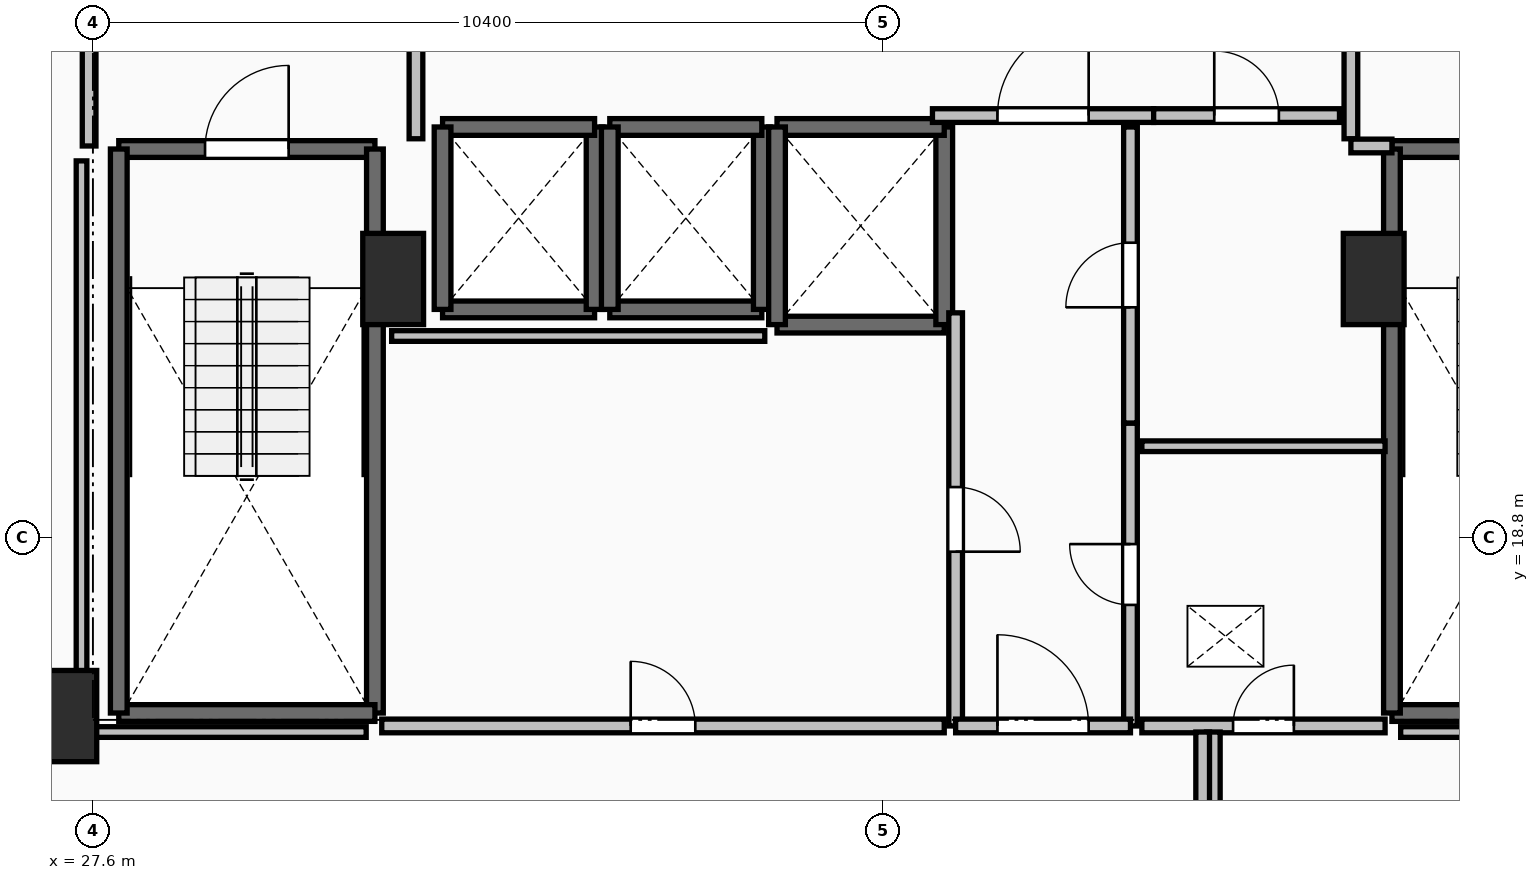
"""IFC4 building model, lengths in metres.
Left out: names, types, materials, properties, quantities, classifications, styles, units other than length and angle.
Written with IfcOpenShell. Run it as: python <this file> out.ifc"""

import sys

from ifc_helpers import new_model, si_unit, direction, frame, frame_2d, origin, origin_2d, place, context, subcontext, project, spatial, rectangle, extrude, element, fill, save


model = new_model("IFC4")
c1 = context("Model", 3, precision=1e-05, world=origin(), true_north=direction((0.0, 1.0)))
c2 = subcontext(c1, "Body", "Model", "MODEL_VIEW")
j1 = project(units=[si_unit("LENGTHUNIT", "METRE"), si_unit("PLANEANGLEUNIT", "RADIAN")], contexts=[c1])
p1 = place(None, origin())
s1 = spatial("IfcSite", under=j1, at=p1, CompositionType="ELEMENT")
p2 = place(p1, origin())
s2 = spatial("IfcBuilding", under=s1, at=p2, CompositionType="ELEMENT")
p3 = place(p2, frame((0.0, 0.0, 120.8)))
s3 = spatial("IfcBuildingStorey", under=s2, at=p3, CompositionType="ELEMENT", Elevation=120.8)
for number, where, z_axis, x_axis in (
    (1, (27.25, 16.45, 0.0), (0.0, 0.0, 1.0), (1.0, 0.0, 0.0)),
    (2, (31.55, 22.2, 0.0), (0.0, 0.0, 1.0), (1.0, 0.0, 0.0)),
    (3, (44.45, 22.2, 0.0), (0.0, 0.0, 1.0), (1.0, 0.0, 0.0)),
):
    element("IfcColumn", number, at=place(p3, frame(where, z_axis=z_axis, x_axis=x_axis)), inside=s3, PredefinedType="PILASTER", context=c2, shape_type="SweptSolid", body=[
        extrude(rectangle(XDim=0.8, YDim=1.2, at=origin_2d()), origin(), (0.0, 0.0, 1.0), 3.5),
    ])
p4 = place(p3, frame((27.94, 23.91, 0.0), z_axis=(0.0, 0.0, 1.0), x_axis=(1.0, 0.0, 0.0)))
e4 = element("IfcWall", 4, at=p4, inside=s3, PredefinedType="SOLIDWALL", context=c2, shape_type="SweptSolid", body=[
    extrude(rectangle(XDim=3.37, YDim=0.22, at=frame_2d((1.685, 0.0))), origin(), (0.0, 0.0, 1.0), 3.15),
])
p5 = place(p4, frame((1.135, 0.0, 0.0)))
e5 = element("IfcOpeningElement", 5, at=p5, cuts=e4, PredefinedType="OPENING", context=c2, shape_type="SweptSolid", body=[
    extrude(rectangle(XDim=1.1, YDim=2.15, at=frame_2d((0.55, 1.075))), frame((0.0, 0.125, 0.0), z_axis=(0.0, -1.0, 0.0), x_axis=(1.0, 0.0, 0.0)), (0.0, 0.0, 1.0), 0.25),
])
p6 = place(p3, frame((31.31, 23.91, 0.0), z_axis=(0.0, 0.0, 1.0), x_axis=(0.0, -1.0, 0.0)))
e6 = element("IfcWall", 6, at=p6, inside=s3, PredefinedType="SOLIDWALL", context=c2, shape_type="SweptSolid", body=[
    extrude(rectangle(XDim=7.42, YDim=0.22, at=frame_2d((3.71, 0.0))), origin(), (0.0, 0.0, 1.0), 3.15),
])
p7 = place(p3, frame((31.31, 16.49, 0.0), z_axis=(0.0, 0.0, 1.0), x_axis=(-1.0, 0.0, 0.0)))
e7 = element("IfcWall", 7, at=p7, inside=s3, PredefinedType="SOLIDWALL", context=c2, shape_type="SweptSolid", body=[
    extrude(rectangle(XDim=3.37, YDim=0.22, at=frame_2d((1.685, 0.0))), origin(), (0.0, 0.0, 1.0), 3.15),
])
p8 = place(p3, frame((27.94, 16.49, 0.0), z_axis=(0.0, 0.0, 1.0), x_axis=(0.0, 1.0, 0.0)))
e8 = element("IfcWall", 8, at=p8, inside=s3, PredefinedType="SOLIDWALL", context=c2, shape_type="SweptSolid", body=[
    extrude(rectangle(XDim=7.42, YDim=0.22, at=frame_2d((3.71, 0.0))), origin(), (0.0, 0.0, 1.0), 3.15),
])
p9 = place(p3, frame((44.69, 23.91, 0.0), z_axis=(0.0, 0.0, 1.0), x_axis=(1.0, 0.0, 0.0)))
e9 = element("IfcWall", 9, at=p9, inside=s3, PredefinedType="SOLIDWALL", context=c2, shape_type="SweptSolid", body=[
    extrude(rectangle(XDim=3.37, YDim=0.22, at=frame_2d((1.685, 0.0))), origin(), (0.0, 0.0, 1.0), 3.15),
])
p10 = place(p9, frame((1.135, 0.0, 0.0)))
e10 = element("IfcOpeningElement", 10, at=p10, cuts=e9, PredefinedType="OPENING", context=c2, shape_type="SweptSolid", body=[
    extrude(rectangle(XDim=1.1, YDim=2.15, at=frame_2d((0.55, 1.075))), frame((0.0, 0.125, 0.0), z_axis=(0.0, -1.0, 0.0), x_axis=(1.0, 0.0, 0.0)), (0.0, 0.0, 1.0), 0.25),
])
p11 = place(p3, frame((48.06, 16.49, 0.0), z_axis=(0.0, 0.0, 1.0), x_axis=(-1.0, 0.0, 0.0)))
e11 = element("IfcWall", 11, at=p11, inside=s3, PredefinedType="SOLIDWALL", context=c2, shape_type="SweptSolid", body=[
    extrude(rectangle(XDim=3.37, YDim=0.22, at=frame_2d((1.685, 0.0))), origin(), (0.0, 0.0, 1.0), 3.15),
])
p12 = place(p3, frame((44.69, 16.49, 0.0), z_axis=(0.0, 0.0, 1.0), x_axis=(0.0, 1.0, 0.0)))
e12 = element("IfcWall", 12, at=p12, inside=s3, PredefinedType="SOLIDWALL", context=c2, shape_type="SweptSolid", body=[
    extrude(rectangle(XDim=7.42, YDim=0.22, at=frame_2d((3.71, 0.0))), origin(), (0.0, 0.0, 1.0), 3.15),
])
p13 = place(p3, frame((32.2, 21.8, 0.0), z_axis=(0.0, 0.0, 1.0), x_axis=(1.0, 0.0, 0.0)))
e13 = element("IfcWall", 13, at=p13, inside=s3, PredefinedType="SOLIDWALL", context=c2, shape_type="SweptSolid", body=[
    extrude(rectangle(XDim=2.0, YDim=0.22, at=frame_2d((1.0, 0.0))), origin(), (0.0, 0.0, 1.0), 3.15),
])
p14 = place(p3, frame((34.2, 21.8, 0.0), z_axis=(0.0, 0.0, 1.0), x_axis=(0.0, 1.0, 0.0)))
e14 = element("IfcWall", 14, at=p14, inside=s3, PredefinedType="SOLIDWALL", context=c2, shape_type="SweptSolid", body=[
    extrude(rectangle(XDim=2.4, YDim=0.22, at=frame_2d((1.2, 0.0))), origin(), (0.0, 0.0, 1.0), 3.15),
])
p15 = place(p3, frame((34.2, 24.2, 0.0), z_axis=(0.0, 0.0, 1.0), x_axis=(-1.0, 0.0, 0.0)))
e15 = element("IfcWall", 15, at=p15, inside=s3, PredefinedType="SOLIDWALL", context=c2, shape_type="SweptSolid", body=[
    extrude(rectangle(XDim=2.0, YDim=0.22, at=frame_2d((1.0, 0.0))), origin(), (0.0, 0.0, 1.0), 3.15),
])
p16 = place(p3, frame((32.2, 24.2, 0.0), z_axis=(0.0, 0.0, 1.0), x_axis=(0.0, -1.0, 0.0)))
e16 = element("IfcWall", 16, at=p16, inside=s3, PredefinedType="SOLIDWALL", context=c2, shape_type="SweptSolid", body=[
    extrude(rectangle(XDim=2.4, YDim=0.22, at=frame_2d((1.2, 0.0))), origin(), (0.0, 0.0, 1.0), 3.15),
])
p17 = place(p3, frame((34.4, 21.8, 0.0), z_axis=(0.0, 0.0, 1.0), x_axis=(1.0, 0.0, 0.0)))
e17 = element("IfcWall", 17, at=p17, inside=s3, PredefinedType="SOLIDWALL", context=c2, shape_type="SweptSolid", body=[
    extrude(rectangle(XDim=2.0, YDim=0.22, at=frame_2d((1.0, 0.0))), origin(), (0.0, 0.0, 1.0), 3.15),
])
p18 = place(p3, frame((36.4, 21.8, 0.0), z_axis=(0.0, 0.0, 1.0), x_axis=(0.0, 1.0, 0.0)))
e18 = element("IfcWall", 18, at=p18, inside=s3, PredefinedType="SOLIDWALL", context=c2, shape_type="SweptSolid", body=[
    extrude(rectangle(XDim=2.4, YDim=0.22, at=frame_2d((1.2, 0.0))), origin(), (0.0, 0.0, 1.0), 3.15),
])
p19 = place(p3, frame((36.4, 24.2, 0.0), z_axis=(0.0, 0.0, 1.0), x_axis=(-1.0, 0.0, 0.0)))
e19 = element("IfcWall", 19, at=p19, inside=s3, PredefinedType="SOLIDWALL", context=c2, shape_type="SweptSolid", body=[
    extrude(rectangle(XDim=2.0, YDim=0.22, at=frame_2d((1.0, 0.0))), origin(), (0.0, 0.0, 1.0), 3.15),
])
p20 = place(p3, frame((34.4, 24.2, 0.0), z_axis=(0.0, 0.0, 1.0), x_axis=(0.0, -1.0, 0.0)))
e20 = element("IfcWall", 20, at=p20, inside=s3, PredefinedType="SOLIDWALL", context=c2, shape_type="SweptSolid", body=[
    extrude(rectangle(XDim=2.4, YDim=0.22, at=frame_2d((1.2, 0.0))), origin(), (0.0, 0.0, 1.0), 3.15),
])
p21 = place(p3, frame((36.6, 21.6, 0.0), z_axis=(0.0, 0.0, 1.0), x_axis=(1.0, 0.0, 0.0)))
e21 = element("IfcWall", 21, at=p21, inside=s3, PredefinedType="SOLIDWALL", context=c2, shape_type="SweptSolid", body=[
    extrude(rectangle(XDim=2.2, YDim=0.22, at=frame_2d((1.1, 0.0))), origin(), (0.0, 0.0, 1.0), 3.15),
])
p22 = place(p3, frame((38.8, 21.6, 0.0), z_axis=(0.0, 0.0, 1.0), x_axis=(0.0, 1.0, 0.0)))
e22 = element("IfcWall", 22, at=p22, inside=s3, PredefinedType="SOLIDWALL", context=c2, shape_type="SweptSolid", body=[
    extrude(rectangle(XDim=2.6, YDim=0.22, at=frame_2d((1.3, 0.0))), origin(), (0.0, 0.0, 1.0), 3.15),
])
p23 = place(p3, frame((38.8, 24.2, 0.0), z_axis=(0.0, 0.0, 1.0), x_axis=(-1.0, 0.0, 0.0)))
e23 = element("IfcWall", 23, at=p23, inside=s3, PredefinedType="SOLIDWALL", context=c2, shape_type="SweptSolid", body=[
    extrude(rectangle(XDim=2.2, YDim=0.22, at=frame_2d((1.1, 0.0))), origin(), (0.0, 0.0, 1.0), 3.15),
])
p24 = place(p3, frame((36.6, 24.2, 0.0), z_axis=(0.0, 0.0, 1.0), x_axis=(0.0, -1.0, 0.0)))
e24 = element("IfcWall", 24, at=p24, inside=s3, PredefinedType="SOLIDWALL", context=c2, shape_type="SweptSolid", body=[
    extrude(rectangle(XDim=2.6, YDim=0.22, at=frame_2d((1.3, 0.0))), origin(), (0.0, 0.0, 1.0), 3.15),
])
p25 = place(p3, frame((31.85, 24.045, 0.0), z_axis=(0.0, 0.0, 1.0), x_axis=(0.0, 1.0, 0.0)))
e25 = element("IfcWall", 25, at=p25, inside=s3, PredefinedType="PARTITIONING", context=c2, shape_type="SweptSolid", body=[
    extrude(rectangle(XDim=3.91, YDim=0.18, at=frame_2d((1.955, 0.0))), origin(), (0.0, 0.0, 1.0), 3.15),
])
p26 = place(p25, frame((1.355, 0.0, 0.0)))
e26 = element("IfcOpeningElement", 26, at=p26, cuts=e25, PredefinedType="OPENING", context=c2, shape_type="SweptSolid", body=[
    extrude(rectangle(XDim=1.2, YDim=2.15, at=frame_2d((0.6, 1.075))), frame((0.0, 0.105, 0.0), z_axis=(0.0, -1.0, 0.0), x_axis=(1.0, 0.0, 0.0)), (0.0, 0.0, 1.0), 0.21),
])
p27 = place(p3, frame((27.55, 28.0, 0.0), z_axis=(0.0, 0.0, 1.0), x_axis=(0.0, -1.0, 0.0)))
e27 = element("IfcWall", 27, at=p27, inside=s3, PredefinedType="PARTITIONING", context=c2, shape_type="SweptSolid", body=[
    extrude(rectangle(XDim=4.05, YDim=0.18, at=frame_2d((2.025, 0.0))), origin(), (0.0, 0.0, 1.0), 3.15),
])
p28 = place(p27, frame((1.425, 0.0, 0.0)))
e28 = element("IfcOpeningElement", 28, at=p28, cuts=e27, PredefinedType="OPENING", context=c2, shape_type="SweptSolid", body=[
    extrude(rectangle(XDim=1.2, YDim=2.15, at=frame_2d((0.6, 1.075))), frame((0.0, 0.105, 0.0), z_axis=(0.0, -1.0, 0.0), x_axis=(1.0, 0.0, 0.0)), (0.0, 0.0, 1.0), 0.21),
])
p29 = place(p3, frame((44.15, 27.955, 0.0), z_axis=(0.0, 0.0, 1.0), x_axis=(0.0, -1.0, 0.0)))
e29 = element("IfcWall", 29, at=p29, inside=s3, PredefinedType="PARTITIONING", context=c2, shape_type="SweptSolid", body=[
    extrude(rectangle(XDim=3.91, YDim=0.18, at=frame_2d((1.955, 0.0))), origin(), (0.0, 0.0, 1.0), 3.15),
])
p30 = place(p29, frame((1.355, 0.0, 0.0)))
e30 = element("IfcOpeningElement", 30, at=p30, cuts=e29, PredefinedType="OPENING", context=c2, shape_type="SweptSolid", body=[
    extrude(rectangle(XDim=1.2, YDim=2.15, at=frame_2d((0.6, 1.075))), frame((0.0, 0.105, 0.0), z_axis=(0.0, -1.0, 0.0), x_axis=(1.0, 0.0, 0.0)), (0.0, 0.0, 1.0), 0.21),
])
p31 = place(p3, frame((44.15, 23.95, 0.0), z_axis=(0.0, 0.0, 1.0), x_axis=(1.0, 0.0, 0.0)))
e31 = element("IfcWall", 31, at=p31, inside=s3, PredefinedType="PARTITIONING", context=c2, shape_type="SweptSolid", body=[
    extrude(rectangle(XDim=0.54, YDim=0.18, at=frame_2d((0.27, 0.0))), origin(), (0.0, 0.0, 1.0), 3.15),
])
p32 = place(p3, frame((38.645, 24.35, 0.0), z_axis=(0.0, 0.0, 1.0), x_axis=(1.0, 0.0, 0.0)))
e32 = element("IfcWall", 32, at=p32, inside=s3, PredefinedType="PARTITIONING", context=c2, shape_type="SweptSolid", body=[
    extrude(rectangle(XDim=2.91, YDim=0.18, at=frame_2d((1.455, 0.0))), origin(), (0.0, 0.0, 1.0), 3.15),
])
p33 = place(p32, frame((0.855, 0.0, 0.0)))
e33 = element("IfcOpeningElement", 33, at=p33, cuts=e32, PredefinedType="OPENING", context=c2, shape_type="SweptSolid", body=[
    extrude(rectangle(XDim=1.2, YDim=2.15, at=frame_2d((0.6, 1.075))), frame((0.0, 0.105, 0.0), z_axis=(0.0, -1.0, 0.0), x_axis=(1.0, 0.0, 0.0)), (0.0, 0.0, 1.0), 0.21),
])
p34 = place(p3, frame((41.555, 24.35, 0.0), z_axis=(0.0, 0.0, 1.0), x_axis=(1.0, 0.0, 0.0)))
e34 = element("IfcWall", 34, at=p34, inside=s3, PredefinedType="PARTITIONING", context=c2, shape_type="SweptSolid", body=[
    extrude(rectangle(XDim=2.445, YDim=0.18, at=frame_2d((1.223, 0.0))), origin(), (0.0, 0.0, 1.0), 3.15),
])
p35 = place(p34, frame((0.798, 0.0, 0.0)))
e35 = element("IfcOpeningElement", 35, at=p35, cuts=e34, PredefinedType="OPENING", context=c2, shape_type="SweptSolid", body=[
    extrude(rectangle(XDim=0.85, YDim=2.1, at=frame_2d((0.425, 1.05))), frame((0.0, 0.105, 0.0), z_axis=(0.0, -1.0, 0.0), x_axis=(1.0, 0.0, 0.0)), (0.0, 0.0, 1.0), 0.21),
])
p36 = place(p3, frame((41.25, 16.32, 0.0), z_axis=(0.0, 0.0, 1.0), x_axis=(0.0, 1.0, 0.0)))
e36 = element("IfcWall", 36, at=p36, inside=s3, PredefinedType="PARTITIONING", context=c2, shape_type="SweptSolid", body=[
    extrude(rectangle(XDim=3.985, YDim=0.18, at=frame_2d((1.992, 0.0))), origin(), (0.0, 0.0, 1.0), 3.15),
])
p37 = place(p36, frame((1.593, 0.0, 0.0)))
e37 = element("IfcOpeningElement", 37, at=p37, cuts=e36, PredefinedType="OPENING", context=c2, shape_type="SweptSolid", body=[
    extrude(rectangle(XDim=0.8, YDim=2.05, at=frame_2d((0.4, 1.025))), frame((0.0, 0.105, 0.0), z_axis=(0.0, -1.0, 0.0), x_axis=(1.0, 0.0, 0.0)), (0.0, 0.0, 1.0), 0.21),
])
p38 = place(p3, frame((41.25, 20.305, 0.0), z_axis=(0.0, 0.0, 1.0), x_axis=(0.0, 1.0, 0.0)))
e38 = element("IfcWall", 38, at=p38, inside=s3, PredefinedType="PARTITIONING", context=c2, shape_type="SweptSolid", body=[
    extrude(rectangle(XDim=3.895, YDim=0.18, at=frame_2d((1.948, 0.0))), origin(), (0.0, 0.0, 1.0), 3.15),
])
p39 = place(p38, frame((1.522, 0.0, 0.0)))
e39 = element("IfcOpeningElement", 39, at=p39, cuts=e38, PredefinedType="OPENING", context=c2, shape_type="SweptSolid", body=[
    extrude(rectangle(XDim=0.85, YDim=2.1, at=frame_2d((0.425, 1.05))), frame((0.0, 0.105, 0.0), z_axis=(0.0, -1.0, 0.0), x_axis=(1.0, 0.0, 0.0)), (0.0, 0.0, 1.0), 0.21),
])
p40 = place(p3, frame((38.95, 21.755, 0.0), z_axis=(0.0, 0.0, 1.0), x_axis=(0.0, -1.0, 0.0)))
e40 = element("IfcWall", 40, at=p40, inside=s3, PredefinedType="PARTITIONING", context=c2, shape_type="SweptSolid", body=[
    extrude(rectangle(XDim=5.435, YDim=0.18, at=frame_2d((2.717, 0.0))), origin(), (0.0, 0.0, 1.0), 3.15),
])
p41 = place(p40, frame((2.292, 0.0, 0.0)))
e41 = element("IfcOpeningElement", 41, at=p41, cuts=e40, PredefinedType="OPENING", context=c2, shape_type="SweptSolid", body=[
    extrude(rectangle(XDim=0.85, YDim=2.1, at=frame_2d((0.425, 1.05))), frame((0.0, 0.105, 0.0), z_axis=(0.0, -1.0, 0.0), x_axis=(1.0, 0.0, 0.0)), (0.0, 0.0, 1.0), 0.21),
])
p42 = place(p3, frame((38.95, 16.32, 0.0), z_axis=(0.0, 0.0, 1.0), x_axis=(1.0, 0.0, 0.0)))
e42 = element("IfcWall", 42, at=p42, inside=s3, PredefinedType="PARTITIONING", context=c2, shape_type="SweptSolid", body=[
    extrude(rectangle(XDim=2.3, YDim=0.18, at=frame_2d((1.15, 0.0))), origin(), (0.0, 0.0, 1.0), 3.15),
])
p43 = place(p42, frame((0.55, 0.0, 0.0)))
e43 = element("IfcOpeningElement", 43, at=p43, cuts=e42, PredefinedType="OPENING", context=c2, shape_type="SweptSolid", body=[
    extrude(rectangle(XDim=1.2, YDim=2.15, at=frame_2d((0.6, 1.075))), frame((0.0, 0.105, 0.0), z_axis=(0.0, -1.0, 0.0), x_axis=(1.0, 0.0, 0.0)), (0.0, 0.0, 1.0), 0.21),
])
p44 = place(p3, frame((44.6, 20.0, 0.0), z_axis=(0.0, 0.0, 1.0), x_axis=(-1.0, 0.0, 0.0)))
e44 = element("IfcWall", 44, at=p44, inside=s3, PredefinedType="PARTITIONING", context=c2, shape_type="SweptSolid", body=[
    extrude(rectangle(XDim=3.2, YDim=0.14, at=frame_2d((1.6, 0.0))), origin(), (0.0, 0.0, 1.0), 3.15),
])
p45 = place(p3, frame((41.4, 16.32, 0.0), z_axis=(0.0, 0.0, 1.0), x_axis=(1.0, 0.0, 0.0)))
e45 = element("IfcWall", 45, at=p45, inside=s3, PredefinedType="PARTITIONING", context=c2, shape_type="SweptSolid", body=[
    extrude(rectangle(XDim=3.2, YDim=0.18, at=frame_2d((1.6, 0.0))), origin(), (0.0, 0.0, 1.0), 3.15),
])
p46 = place(p45, frame((1.2, 0.0, 0.0)))
e46 = element("IfcOpeningElement", 46, at=p46, cuts=e45, PredefinedType="OPENING", context=c2, shape_type="SweptSolid", body=[
    extrude(rectangle(XDim=0.8, YDim=2.05, at=frame_2d((0.4, 1.025))), frame((0.0, 0.105, 0.0), z_axis=(0.0, -1.0, 0.0), x_axis=(1.0, 0.0, 0.0)), (0.0, 0.0, 1.0), 0.21),
])
p47 = place(p3, frame((31.4, 16.32, 0.0), z_axis=(0.0, 0.0, 1.0), x_axis=(1.0, 0.0, 0.0)))
e47 = element("IfcWall", 47, at=p47, inside=s3, PredefinedType="PARTITIONING", context=c2, shape_type="SweptSolid", body=[
    extrude(rectangle(XDim=7.4, YDim=0.18, at=frame_2d((3.7, 0.0))), origin(), (0.0, 0.0, 1.0), 3.15),
])
p48 = place(p47, frame((3.275, 0.0, 0.0)))
e48 = element("IfcOpeningElement", 48, at=p48, cuts=e47, PredefinedType="OPENING", context=c2, shape_type="SweptSolid", body=[
    extrude(rectangle(XDim=0.85, YDim=2.1, at=frame_2d((0.425, 1.05))), frame((0.0, 0.105, 0.0), z_axis=(0.0, -1.0, 0.0), x_axis=(1.0, 0.0, 0.0)), (0.0, 0.0, 1.0), 0.21),
])
for number, where, z_axis, x_axis in (
    (49, (42.34, 16.24, 0.0), (0.0, 0.0, 1.0), (0.0, -1.0, 0.0)),
    (50, (42.2, 14.1, 0.0), (0.0, 0.0, 1.0), (0.0, 1.0, 0.0)),
):
    element("IfcWall", number, at=place(p3, frame(where, z_axis=z_axis, x_axis=x_axis)), inside=s3, PredefinedType="PARTITIONING", context=c2, shape_type="SweptSolid", body=[
        extrude(rectangle(XDim=2.14, YDim=0.18, at=frame_2d((1.07, 0.0))), origin(), (0.0, 0.0, 1.0), 2.784),
    ])
p49 = place(p3, frame((36.439, 21.45, 0.0), z_axis=(0.0, 0.0, 1.0), x_axis=(-1.0, 0.0, 0.0)))
e51 = element("IfcWall", 51, at=p49, inside=s3, PredefinedType="PARTITIONING", context=c2, shape_type="SweptSolid", body=[
    extrude(rectangle(XDim=4.909, YDim=0.14, at=frame_2d((2.455, 0.0))), origin(), (0.0, 0.0, 1.0), 3.15),
])
for number, where, z_axis, x_axis in (
    (52, (48.55, 16.24, 0.0), (0.0, 0.0, 1.0), (-1.0, 0.0, 0.0)),
    (53, (31.195, 16.24, 0.0), (0.0, 0.0, 1.0), (-1.0, 0.0, 0.0)),
):
    element("IfcWall", number, at=place(p3, frame(where, z_axis=z_axis, x_axis=x_axis)), inside=s3, PredefinedType="PARTITIONING", context=c2, shape_type="SweptSolid", body=[
        extrude(rectangle(XDim=3.745, YDim=0.14, at=frame_2d((1.873, 0.0))), origin(), (0.0, 0.0, 1.0), 2.342),
    ])
p50 = place(p3, frame((27.45, 16.24, 0.0), z_axis=(0.0, 0.0, 1.0), x_axis=(0.0, 1.0, 0.0)))
e54 = element("IfcWall", 54, at=p50, inside=s3, PredefinedType="PARTITIONING", context=c2, shape_type="SweptSolid", body=[
    extrude(rectangle(XDim=7.514, YDim=0.14, at=frame_2d((3.757, 0.0))), origin(), (0.0, 0.0, 1.0), 2.342),
])
p51 = place(p5, origin())
e55 = element("IfcDoor", 55, at=p51, inside=s3, OperationType="SINGLE_SWING_RIGHT", PredefinedType="DOOR", context=c2, shape_type="SweptSolid", body=[
    extrude(rectangle(XDim=1.1, YDim=2.15, at=frame_2d((0.55, 1.075))), frame((0.0, 0.025, 0.0), z_axis=(0.0, -1.0, 0.0), x_axis=(1.0, 0.0, 0.0)), (0.0, 0.0, 1.0), 0.05),
])
fill(e5, e55)
p52 = place(p33, origin())
e56 = element("IfcDoor", 56, at=p52, inside=s3, OperationType="SINGLE_SWING_RIGHT", PredefinedType="DOOR", context=c2, shape_type="SweptSolid", body=[
    extrude(rectangle(XDim=1.2, YDim=2.15, at=frame_2d((0.6, 1.075))), frame((0.0, 0.025, 0.0), z_axis=(0.0, -1.0, 0.0), x_axis=(1.0, 0.0, 0.0)), (0.0, 0.0, 1.0), 0.05),
])
fill(e33, e56)
p53 = place(p35, origin())
e57 = element("IfcDoor", 57, at=p53, inside=s3, OperationType="SINGLE_SWING_LEFT", PredefinedType="DOOR", context=c2, shape_type="SweptSolid", body=[
    extrude(rectangle(XDim=0.85, YDim=2.1, at=frame_2d((0.425, 1.05))), frame((0.0, 0.025, 0.0), z_axis=(0.0, -1.0, 0.0), x_axis=(1.0, 0.0, 0.0)), (0.0, 0.0, 1.0), 0.05),
])
fill(e35, e57)
p54 = place(p37, origin())
e58 = element("IfcDoor", 58, at=p54, inside=s3, OperationType="SINGLE_SWING_RIGHT", PredefinedType="DOOR", context=c2, shape_type="SweptSolid", body=[
    extrude(rectangle(XDim=0.8, YDim=2.05, at=frame_2d((0.4, 1.025))), frame((0.0, 0.025, 0.0), z_axis=(0.0, -1.0, 0.0), x_axis=(1.0, 0.0, 0.0)), (0.0, 0.0, 1.0), 0.05),
])
fill(e37, e58)
p55 = place(p39, origin())
e59 = element("IfcDoor", 59, at=p55, inside=s3, OperationType="SINGLE_SWING_LEFT", PredefinedType="DOOR", context=c2, shape_type="SweptSolid", body=[
    extrude(rectangle(XDim=0.85, YDim=2.1, at=frame_2d((0.425, 1.05))), frame((0.0, 0.025, 0.0), z_axis=(0.0, -1.0, 0.0), x_axis=(1.0, 0.0, 0.0)), (0.0, 0.0, 1.0), 0.05),
])
fill(e39, e59)
p56 = place(p41, origin())
e60 = element("IfcDoor", 60, at=p56, inside=s3, OperationType="SINGLE_SWING_RIGHT", PredefinedType="DOOR", context=c2, shape_type="SweptSolid", body=[
    extrude(rectangle(XDim=0.85, YDim=2.1, at=frame_2d((0.425, 1.05))), frame((0.0, 0.025, 0.0), z_axis=(0.0, -1.0, 0.0), x_axis=(1.0, 0.0, 0.0)), (0.0, 0.0, 1.0), 0.05),
])
fill(e41, e60)
p57 = place(p43, origin())
e61 = element("IfcDoor", 61, at=p57, inside=s3, OperationType="SINGLE_SWING_LEFT", PredefinedType="DOOR", context=c2, shape_type="SweptSolid", body=[
    extrude(rectangle(XDim=1.2, YDim=2.15, at=frame_2d((0.6, 1.075))), frame((0.0, 0.025, 0.0), z_axis=(0.0, -1.0, 0.0), x_axis=(1.0, 0.0, 0.0)), (0.0, 0.0, 1.0), 0.05),
])
fill(e43, e61)
p58 = place(p46, origin())
e62 = element("IfcDoor", 62, at=p58, inside=s3, OperationType="SINGLE_SWING_RIGHT", PredefinedType="DOOR", context=c2, shape_type="SweptSolid", body=[
    extrude(rectangle(XDim=0.8, YDim=2.05, at=frame_2d((0.4, 1.025))), frame((0.0, 0.025, 0.0), z_axis=(0.0, -1.0, 0.0), x_axis=(1.0, 0.0, 0.0)), (0.0, 0.0, 1.0), 0.05),
])
fill(e46, e62)
p59 = place(p48, origin())
e63 = element("IfcDoor", 63, at=p59, inside=s3, OperationType="SINGLE_SWING_LEFT", PredefinedType="DOOR", context=c2, shape_type="SweptSolid", body=[
    extrude(rectangle(XDim=0.85, YDim=2.1, at=frame_2d((0.425, 1.05))), frame((0.0, 0.025, 0.0), z_axis=(0.0, -1.0, 0.0), x_axis=(1.0, 0.0, 0.0)), (0.0, 0.0, 1.0), 0.05),
])
fill(e48, e63)
save(model, sys.argv[1])
